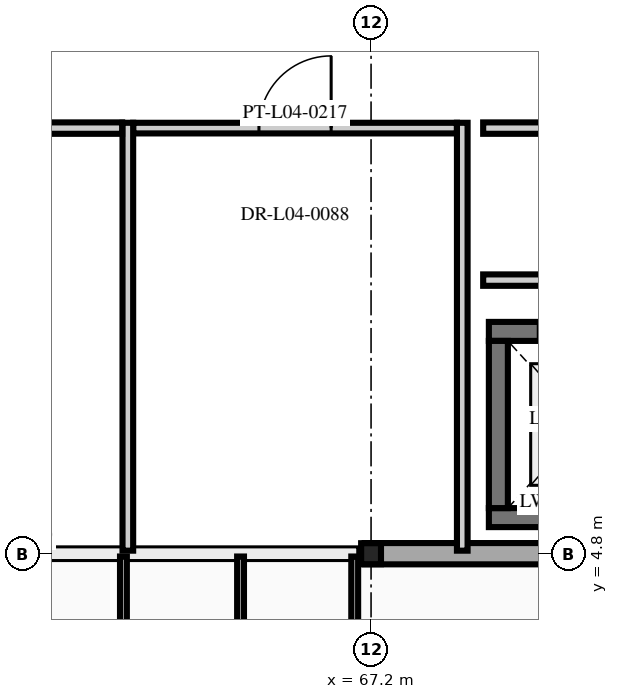
"""IFC4 building model, lengths in metres.
Left out: names, types, materials, properties, quantities, classifications, styles, units other than length and angle.
Written with IfcOpenShell. Run it as: python <this file> out.ifc"""

import sys

from ifc_helpers import new_model, si_unit, direction, frame, frame_2d, origin, origin_2d, place, context, subcontext, project, spatial, rectangle, i_section, extrude, element, fill, save


model = new_model("IFC4")
c1 = context("Model", 3, precision=1e-05, world=origin(), true_north=direction((0.0, 1.0)))
c2 = subcontext(c1, "Body", "Model", "MODEL_VIEW")
j1 = project(units=[si_unit("LENGTHUNIT", "METRE"), si_unit("PLANEANGLEUNIT", "RADIAN")], contexts=[c1])
p1 = place(None, origin())
s1 = spatial("IfcSite", under=j1, at=p1, CompositionType="ELEMENT")
p2 = place(p1, origin())
s2 = spatial("IfcBuilding", under=s1, at=p2, CompositionType="ELEMENT")
p3 = place(p2, frame((0.0, 0.0, 18.6)))
s3 = spatial("IfcBuildingStorey", under=s2, at=p3, CompositionType="ELEMENT", Elevation=18.6)
p4 = place(p3, frame((67.2, 4.8, 0.0), z_axis=(0.0, 0.0, 1.0), x_axis=(1.0, 0.0, 0.0)))
e1 = element("IfcColumn", 1, at=p4, inside=s3, PredefinedType="COLUMN", context=c2, shape_type="SweptSolid", body=[
    extrude(i_section(OverallWidth=0.261, OverallDepth=0.276, WebThickness=0.015, FlangeThickness=0.025, at=origin_2d()), origin(), (0.0, 0.0, 1.0), 4.5),
])
p5 = place(p3, frame((71.25, 5.275, 0.0), z_axis=(0.0, 0.0, 1.0), x_axis=(-1.0, 0.0, 0.0)))
e2 = element("IfcWall", 2, at=p5, inside=s3, PredefinedType="SHEAR", context=c2, shape_type="SweptSolid", body=[
    extrude(rectangle(XDim=2.5, YDim=0.25, at=frame_2d((1.25, 0.0))), origin(), (0.0, 0.0, 1.0), 4.28),
])
p6 = place(p3, frame((68.75, 7.725, 0.0), z_axis=(0.0, 0.0, 1.0), x_axis=(1.0, 0.0, 0.0)))
e3 = element("IfcWall", 3, at=p6, inside=s3, PredefinedType="SHEAR", context=c2, shape_type="SweptSolid", body=[
    extrude(rectangle(XDim=2.5, YDim=0.25, at=frame_2d((1.25, 0.0))), origin(), (0.0, 0.0, 1.0), 4.28),
])
p7 = place(p6, frame((0.65, 0.0, 0.0)))
e4 = element("IfcOpeningElement", 4, at=p7, cuts=e3, PredefinedType="OPENING", context=c2, shape_type="SweptSolid", body=[
    extrude(rectangle(XDim=1.2, YDim=2.2, at=frame_2d((0.6, 1.1))), frame((0.0, 0.135, 0.0), z_axis=(0.0, -1.0, 0.0), x_axis=(1.0, 0.0, 0.0)), (0.0, 0.0, 1.0), 0.27),
])
p8 = place(p3, frame((68.875, 5.4, 0.0), z_axis=(0.0, 0.0, 1.0), x_axis=(0.0, 1.0, 0.0)))
e5 = element("IfcWall", 5, at=p8, inside=s3, PredefinedType="SHEAR", context=c2, shape_type="SweptSolid", body=[
    extrude(rectangle(XDim=2.2, YDim=0.25, at=frame_2d((1.1, 0.0))), origin(), (0.0, 0.0, 1.0), 4.28),
])
p9 = place(p3, frame((76.885, 4.8, 0.0), z_axis=(0.0, 0.0, 1.0), x_axis=(-1.0, 0.0, 0.0)))
e6 = element("IfcWall", 6, at=p9, inside=s3, PredefinedType="SOLIDWALL", context=c2, shape_type="SweptSolid", body=[
    extrude(rectangle(XDim=9.77, YDim=0.28, at=frame_2d((4.885, 0.0))), origin(), (0.0, 0.0, 1.0), 3.855),
])
p10 = place(p9, frame((3.685, 0.0, 0.95)))
e7 = element("IfcOpeningElement", 7, at=p10, cuts=e6, PredefinedType="OPENING", context=c2, shape_type="SweptSolid", body=[
    extrude(rectangle(XDim=2.4, YDim=2.1, at=frame_2d((1.2, 1.05))), frame((0.0, 0.15, 0.0), z_axis=(0.0, -1.0, 0.0), x_axis=(1.0, 0.0, 0.0)), (0.0, 0.0, 1.0), 0.3),
])
p11 = place(p3, frame((64.07, 10.4, 0.0), z_axis=(0.0, 0.0, 1.0), x_axis=(1.0, 0.0, 0.0)))
e8 = element("IfcWall", 8, at=p11, inside=s3, PredefinedType="PARTITIONING", context=c2, shape_type="SweptSolid", body=[
    extrude(rectangle(XDim=4.26, YDim=0.14, at=frame_2d((2.13, 0.0))), origin(), (0.0, 0.0, 1.0), 3.925),
])
p12 = place(p11, frame((1.655, 0.0, 0.0)))
e9 = element("IfcOpeningElement", 9, at=p12, cuts=e8, PredefinedType="OPENING", context=c2, shape_type="SweptSolid", body=[
    extrude(rectangle(XDim=0.95, YDim=2.1, at=frame_2d((0.475, 1.05))), frame((0.0, 0.08, 0.0), z_axis=(0.0, -1.0, 0.0), x_axis=(1.0, 0.0, 0.0)), (0.0, 0.0, 1.0), 0.16),
])
for number, where, z_axis, x_axis in (
    (10, (64.0, 4.84, 0.0), (0.0, 0.0, 1.0), (0.0, 1.0, 0.0)),
    (11, (68.4, 4.84, 0.0), (0.0, 0.0, 1.0), (0.0, 1.0, 0.0)),
):
    element("IfcWall", number, at=place(p3, frame(where, z_axis=z_axis, x_axis=x_axis)), inside=s3, PredefinedType="PARTITIONING", context=c2, shape_type="SweptSolid", body=[
        extrude(rectangle(XDim=5.63, YDim=0.14, at=frame_2d((2.815, 0.0))), origin(), (0.0, 0.0, 1.0), 3.855),
    ])
p13 = place(p3, frame((57.6, 10.4, 0.0), z_axis=(0.0, 0.0, 1.0), x_axis=(1.0, 0.0, 0.0)))
e12 = element("IfcWall", 12, at=p13, inside=s3, PredefinedType="PARTITIONING", context=c2, shape_type="SweptSolid", body=[
    extrude(rectangle(XDim=6.325, YDim=0.15, at=frame_2d((3.163, 0.0))), origin(), (0.0, 0.0, 1.0), 3.925),
])
p14 = place(p13, frame((2.587, 0.0, 0.0)))
e13 = element("IfcOpeningElement", 13, at=p14, cuts=e12, PredefinedType="OPENING", context=c2, shape_type="SweptSolid", body=[
    extrude(rectangle(XDim=1.15, YDim=2.25, at=frame_2d((0.575, 1.125))), frame((0.0, 0.085, 0.0), z_axis=(0.0, -1.0, 0.0), x_axis=(1.0, 0.0, 0.0)), (0.0, 0.0, 1.0), 0.17),
])
p15 = place(p3, frame((68.675, 8.4, 0.0), z_axis=(0.0, 0.0, 1.0), x_axis=(1.0, 0.0, 0.0)))
e14 = element("IfcWall", 14, at=p15, inside=s3, PredefinedType="PARTITIONING", context=c2, shape_type="SweptSolid", body=[
    extrude(rectangle(XDim=7.45, YDim=0.15, at=frame_2d((3.725, 0.0))), origin(), (0.0, 0.0, 1.0), 4.025),
])
p16 = place(p3, frame((68.675, 10.4, 0.0), z_axis=(0.0, 0.0, 1.0), x_axis=(1.0, 0.0, 0.0)))
e15 = element("IfcWall", 15, at=p16, inside=s3, PredefinedType="PARTITIONING", context=c2, shape_type="SweptSolid", body=[
    extrude(rectangle(XDim=7.45, YDim=0.15, at=frame_2d((3.725, 0.0))), origin(), (0.0, 0.0, 1.0), 4.025),
])
p17 = place(p16, frame((3.25, 0.0, 0.0)))
e16 = element("IfcOpeningElement", 16, at=p17, cuts=e15, PredefinedType="OPENING", context=c2, shape_type="SweptSolid", body=[
    extrude(rectangle(XDim=0.95, YDim=2.15, at=frame_2d((0.475, 1.075))), frame((0.0, 0.085, 0.0), z_axis=(0.0, -1.0, 0.0), x_axis=(1.0, 0.0, 0.0)), (0.0, 0.0, 1.0), 0.17),
])
p18 = place(p12, origin())
e17 = element("IfcDoor", 17, at=p18, inside=s3, OperationType="SINGLE_SWING_RIGHT", PredefinedType="DOOR", context=c2, shape_type="SweptSolid", body=[
    extrude(rectangle(XDim=0.95, YDim=2.1, at=frame_2d((0.475, 1.05))), frame((0.0, 0.025, 0.0), z_axis=(0.0, -1.0, 0.0), x_axis=(1.0, 0.0, 0.0)), (0.0, 0.0, 1.0), 0.05),
])
fill(e9, e17)
save(model, sys.argv[1])
